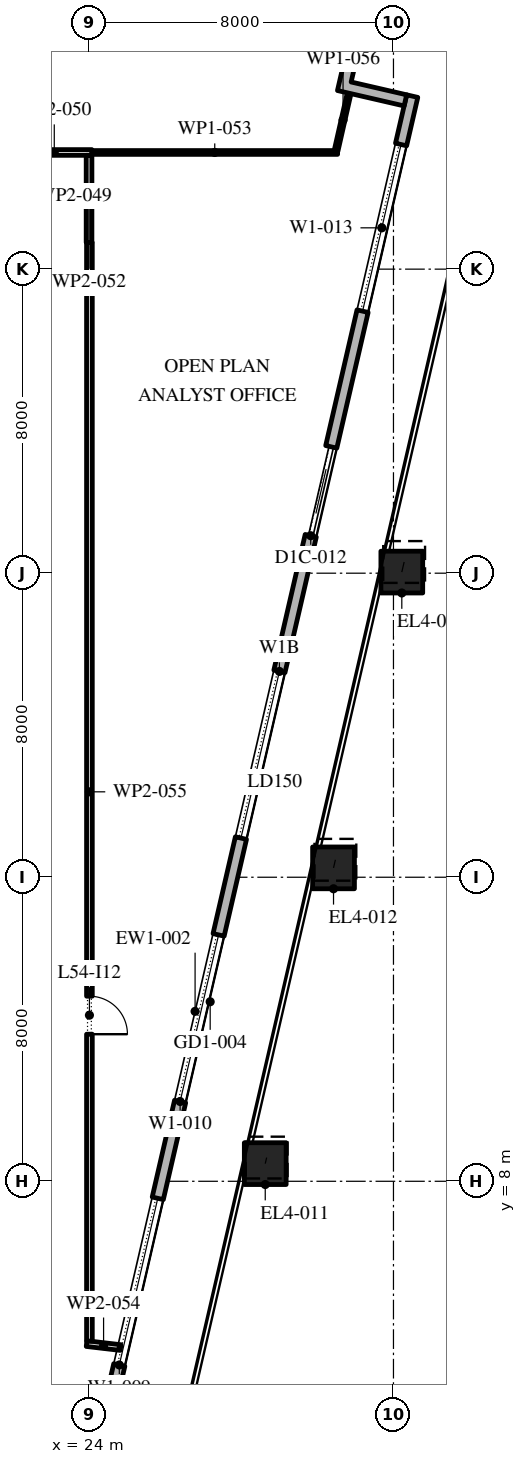
"""IFC4 building model, lengths in metres.
Left out: names, types, materials, properties, quantities, classifications, styles, units other than length and angle.
Written with IfcOpenShell. Run it as: python <this file> out.ifc"""

import sys

from ifc_helpers import new_model, si_unit, direction, frame, frame_2d, origin, origin_2d, place, context, subcontext, project, spatial, polyline, rectangle, outline, extrude, element, fill, save


model = new_model("IFC4")
c1 = context("Model", 3, precision=1e-05, world=origin(), true_north=direction((0.0, 1.0)))
c2 = subcontext(c1, "Body", "Model", "MODEL_VIEW")
j1 = project(units=[si_unit("LENGTHUNIT", "METRE"), si_unit("PLANEANGLEUNIT", "RADIAN")], contexts=[c1])
p1 = place(None, origin())
s1 = spatial("IfcSite", under=j1, at=p1, CompositionType="ELEMENT")
p2 = place(p1, origin())
s2 = spatial("IfcBuilding", under=s1, at=p2, CompositionType="ELEMENT")
p3 = place(p2, frame((0.0, 0.0, 251.4)))
s3 = spatial("IfcBuildingStorey", under=s2, at=p3, CompositionType="ELEMENT", Elevation=251.4)
p4 = place(p3, frame((28.626, 8.464, 0.0), z_axis=(0.008770375651, 0.037927518544, 0.999242004646), x_axis=(-0.974290512438, 0.225295355862, 0.0)))
e1 = element("IfcColumn", 1, at=p4, inside=s3, PredefinedType="COLUMN", context=c2, shape_type="SweptSolid", body=[
    extrude(rectangle(XDim=1.1, YDim=1.1, at=origin_2d()), origin(), (0.0, 0.0, 1.0), 4.203),
])
p5 = place(p3, frame((30.423, 16.247, 0.0), z_axis=(0.011667590749, 0.050559559912, 0.998652891764), x_axis=(-0.974391195695, 0.224859506699, 0.0)))
e2 = element("IfcColumn", 2, at=p5, inside=s3, PredefinedType="COLUMN", context=c2, shape_type="SweptSolid", body=[
    extrude(rectangle(XDim=1.1, YDim=1.1, at=origin_2d()), origin(), (0.0, 0.0, 1.0), 4.206),
])
p6 = place(p3, frame((32.219, 24.029, 0.0), z_axis=(0.014616990755, 0.063108277545, 0.997899638684), x_axis=(-0.974209784844, 0.225644178107, 0.0)))
e3 = element("IfcColumn", 3, at=p6, inside=s3, PredefinedType="COLUMN", context=c2, shape_type="SweptSolid", body=[
    extrude(rectangle(XDim=1.1, YDim=1.1, at=origin_2d()), origin(), (0.0, 0.0, 1.0), 4.209),
])
p7 = place(p3, frame((34.016, 31.811, 0.0), z_axis=(0.017501014434, 0.075683194872, 0.996978318976), x_axis=(-0.974290512438, 0.225295355862, 0.0)))
e4 = element("IfcColumn", 4, at=p7, inside=s3, PredefinedType="COLUMN", context=c2, shape_type="SweptSolid", body=[
    extrude(rectangle(XDim=1.1, YDim=1.1, at=origin_2d()), origin(), (0.0, 0.0, 1.0), 4.213),
])
p8 = place(p3, frame((21.359, -11.678, 0.0), z_axis=(0.0, 0.0, 1.0), x_axis=(0.224949198343, 0.974370493275, 0.0)))
e5 = element("IfcWall", 5, at=p8, inside=s3, PredefinedType="STANDARD", context=c2, shape_type="SweptSolid", body=[
    extrude(rectangle(XDim=49.5, YDim=0.3, at=frame_2d((24.75, 0.0))), origin(), (0.0, 0.0, 1.0), 4.0),
])
p9 = place(p8, frame((1.157, 0.0, 0.45)))
e6 = element("IfcOpeningElement", 6, at=p9, cuts=e5, PredefinedType="OPENING", context=c2, shape_type="SweptSolid", body=[
    extrude(rectangle(XDim=4.5, YDim=3.05, at=frame_2d((2.25, 1.525))), frame((0.0, 0.16, 0.0), z_axis=(0.0, -1.0, 0.0), x_axis=(1.0, 0.0, 0.0)), (0.0, 0.0, 1.0), 0.32),
])
p10 = place(p8, frame((8.121, 0.0, 0.45)))
e7 = element("IfcOpeningElement", 7, at=p10, cuts=e5, PredefinedType="OPENING", context=c2, shape_type="SweptSolid", body=[
    extrude(rectangle(XDim=4.5, YDim=3.05, at=frame_2d((2.25, 1.525))), frame((0.0, 0.16, 0.0), z_axis=(0.0, -1.0, 0.0), x_axis=(1.0, 0.0, 0.0)), (0.0, 0.0, 1.0), 0.32),
])
p11 = place(p8, frame((15.236, 0.0, 0.45)))
e8 = element("IfcOpeningElement", 8, at=p11, cuts=e5, PredefinedType="OPENING", context=c2, shape_type="SweptSolid", body=[
    extrude(rectangle(XDim=4.5, YDim=3.05, at=frame_2d((2.25, 1.525))), frame((0.0, 0.16, 0.0), z_axis=(0.0, -1.0, 0.0), x_axis=(1.0, 0.0, 0.0)), (0.0, 0.0, 1.0), 0.32),
])
p12 = place(p8, frame((22.35, 0.0, 0.45)))
e9 = element("IfcOpeningElement", 9, at=p12, cuts=e5, PredefinedType="OPENING", context=c2, shape_type="SweptSolid", body=[
    extrude(rectangle(XDim=4.5, YDim=3.05, at=frame_2d((2.25, 1.525))), frame((0.0, 0.16, 0.0), z_axis=(0.0, -1.0, 0.0), x_axis=(1.0, 0.0, 0.0)), (0.0, 0.0, 1.0), 0.32),
])
p13 = place(p8, frame((29.464, 0.0, 0.45)))
e10 = element("IfcOpeningElement", 10, at=p13, cuts=e5, PredefinedType="OPENING", context=c2, shape_type="SweptSolid", body=[
    extrude(rectangle(XDim=4.5, YDim=2.95, at=frame_2d((2.25, 1.475))), frame((0.0, 0.16, 0.0), z_axis=(0.0, -1.0, 0.0), x_axis=(1.0, 0.0, 0.0)), (0.0, 0.0, 1.0), 0.32),
])
p14 = place(p8, frame((37.628, 0.0, 0.0)))
e11 = element("IfcOpeningElement", 11, at=p14, cuts=e5, PredefinedType="OPENING", context=c2, shape_type="SweptSolid", body=[
    extrude(rectangle(XDim=2.4, YDim=3.325, at=frame_2d((1.2, 1.663))), frame((0.0, 0.16, 0.0), z_axis=(0.0, -1.0, 0.0), x_axis=(1.0, 0.0, 0.0)), (0.0, 0.0, 1.0), 0.32),
])
p15 = place(p8, frame((43.693, 0.0, 0.45)))
e12 = element("IfcOpeningElement", 12, at=p15, cuts=e5, PredefinedType="OPENING", context=c2, shape_type="SweptSolid", body=[
    extrude(rectangle(XDim=4.5, YDim=3.05, at=frame_2d((2.25, 1.525))), frame((0.0, 0.16, 0.0), z_axis=(0.0, -1.0, 0.0), x_axis=(1.0, 0.0, 0.0)), (0.0, 0.0, 1.0), 0.32),
])
p16 = place(p3, origin())
e13 = element("IfcWall", 13, at=p16, inside=s3, PredefinedType="STANDARD", context=c2, shape_type="SweptSolid", body=[
    extrude(outline(polyline([(30.931, 38.453), (29.177, 38.858), (29.65, 40.905), (29.942, 40.837), (29.537, 39.083), (31.291, 38.678), (30.886, 36.924), (32.348, 36.587), (32.28, 36.295), (30.526, 36.699), (30.931, 38.453)])), origin(), (0.0, 0.0, 1.0), 4.0),
])
p17 = place(p3, frame((22.085, 35.07, 0.0), z_axis=(0.0, 0.0, 1.0), x_axis=(1.0, 0.0, 0.0)))
e14 = element("IfcWall", 14, at=p17, inside=s3, PredefinedType="PARTITIONING", context=c2, shape_type="SweptSolid", body=[
    extrude(rectangle(XDim=1.98, YDim=0.15, at=frame_2d((0.99, 0.0))), origin(), (0.0, 0.0, 1.0), 4.0),
])
p18 = place(p3, frame((23.99, 34.995, 0.0), z_axis=(0.0, 0.0, 1.0), x_axis=(0.0, -1.0, 0.0)))
e15 = element("IfcWall", 15, at=p18, inside=s3, PredefinedType="PARTITIONING", context=c2, shape_type="SweptSolid", body=[
    extrude(rectangle(XDim=2.295, YDim=0.15, at=frame_2d((1.147, 0.0))), origin(), (0.0, 0.0, 1.0), 4.0),
])
p19 = place(p3, frame((24.065, 35.07, 0.0), z_axis=(0.0, 0.0, 1.0), x_axis=(1.0, 0.0, 0.0)))
e16 = element("IfcWall", 16, at=p19, inside=s3, PredefinedType="PARTITIONING", context=c2, shape_type="SweptSolid", body=[
    extrude(rectangle(XDim=6.465, YDim=0.1, at=frame_2d((3.232, 0.0))), origin(), (0.0, 0.0, 1.0), 4.0),
])
p20 = place(p3, frame((23.925, 3.729, 0.0), z_axis=(0.0, 0.0, 1.0), x_axis=(0.993316052643, -0.115426251616, 0.0)))
e17 = element("IfcWall", 17, at=p20, inside=s3, PredefinedType="PARTITIONING", context=c2, shape_type="SweptSolid", body=[
    extrude(rectangle(XDim=0.901, YDim=0.15, at=frame_2d((0.451, 0.0))), origin(), (0.0, 0.0, 1.0), 4.0),
])
p21 = place(p3, frame((24.0, 32.7, 0.0), z_axis=(0.0, 0.0, 1.0), x_axis=(0.0, -1.0, 0.0)))
e18 = element("IfcWall", 18, at=p21, inside=s3, PredefinedType="PARTITIONING", context=c2, shape_type="SweptSolid", body=[
    extrude(rectangle(XDim=28.905, YDim=0.15, at=frame_2d((14.453, 0.0))), origin(), (0.0, 0.0, 1.0), 4.0),
])
p22 = place(p21, frame((19.83, 0.0, 0.0)))
e19 = element("IfcOpeningElement", 19, at=p22, cuts=e18, PredefinedType="OPENING", context=c2, shape_type="SweptSolid", body=[
    extrude(rectangle(XDim=1.0, YDim=2.1, at=frame_2d((0.5, 1.05))), frame((0.0, 0.085, 0.0), z_axis=(0.0, -1.0, 0.0), x_axis=(1.0, 0.0, 0.0)), (0.0, 0.0, 1.0), 0.17),
])
p23 = place(p3, frame((30.491, 35.119, 0.0), z_axis=(0.0, 0.0, 1.0), x_axis=(0.221461033886, 0.975169221453, 0.0)))
e20 = element("IfcWall", 20, at=p23, inside=s3, PredefinedType="PARTITIONING", context=c2, shape_type="SweptSolid", body=[
    extrude(rectangle(XDim=1.648, YDim=0.1, at=frame_2d((0.824, 0.0))), origin(), (0.0, 0.0, 1.0), 4.0),
])
p24 = place(p11, origin())
e21 = element("IfcWindow", 21, at=p24, inside=s3, PartitioningType="DOUBLE_PANEL_VERTICAL", PredefinedType="WINDOW", context=c2, shape_type="SweptSolid", body=[
    extrude(rectangle(XDim=4.5, YDim=3.05, at=frame_2d((2.25, 1.525))), frame((0.0, 0.03, 0.0), z_axis=(0.0, -1.0, 0.0), x_axis=(1.0, 0.0, 0.0)), (0.0, 0.0, 1.0), 0.06),
])
fill(e8, e21)
p25 = place(p12, origin())
e22 = element("IfcWindow", 22, at=p25, inside=s3, PartitioningType="DOUBLE_PANEL_VERTICAL", PredefinedType="WINDOW", context=c2, shape_type="SweptSolid", body=[
    extrude(rectangle(XDim=4.5, YDim=3.05, at=frame_2d((2.25, 1.525))), frame((0.0, 0.03, 0.0), z_axis=(0.0, -1.0, 0.0), x_axis=(1.0, 0.0, 0.0)), (0.0, 0.0, 1.0), 0.06),
])
fill(e9, e22)
p26 = place(p13, origin())
e23 = element("IfcWindow", 23, at=p26, inside=s3, PartitioningType="DOUBLE_PANEL_VERTICAL", PredefinedType="WINDOW", context=c2, shape_type="SweptSolid", body=[
    extrude(rectangle(XDim=4.5, YDim=2.95, at=frame_2d((2.25, 1.475))), frame((0.0, 0.03, 0.0), z_axis=(0.0, -1.0, 0.0), x_axis=(1.0, 0.0, 0.0)), (0.0, 0.0, 1.0), 0.06),
])
fill(e10, e23)
p27 = place(p14, origin())
e24 = element("IfcDoor", 24, at=p27, inside=s3, OperationType="DOUBLE_DOOR_SLIDING", PredefinedType="DOOR", context=c2, shape_type="SweptSolid", body=[
    extrude(rectangle(XDim=2.4, YDim=3.325, at=frame_2d((1.2, 1.663))), frame((0.0, 0.025, 0.0), z_axis=(0.0, -1.0, 0.0), x_axis=(1.0, 0.0, 0.0)), (0.0, 0.0, 1.0), 0.05),
])
fill(e11, e24)
p28 = place(p15, origin())
e25 = element("IfcWindow", 25, at=p28, inside=s3, PartitioningType="DOUBLE_PANEL_VERTICAL", PredefinedType="WINDOW", context=c2, shape_type="SweptSolid", body=[
    extrude(rectangle(XDim=4.5, YDim=3.05, at=frame_2d((2.25, 1.525))), frame((0.0, 0.03, 0.0), z_axis=(0.0, -1.0, 0.0), x_axis=(1.0, 0.0, 0.0)), (0.0, 0.0, 1.0), 0.06),
])
fill(e12, e25)
p29 = place(p22, origin())
e26 = element("IfcDoor", 26, at=p29, inside=s3, OperationType="SINGLE_SWING_LEFT", PredefinedType="DOOR", context=c2, shape_type="SweptSolid", body=[
    extrude(rectangle(XDim=1.0, YDim=2.1, at=frame_2d((0.5, 1.05))), frame((0.0, 0.025, 0.0), z_axis=(0.0, -1.0, 0.0), x_axis=(1.0, 0.0, 0.0)), (0.0, 0.0, 1.0), 0.05),
])
fill(e19, e26)
save(model, sys.argv[1])
